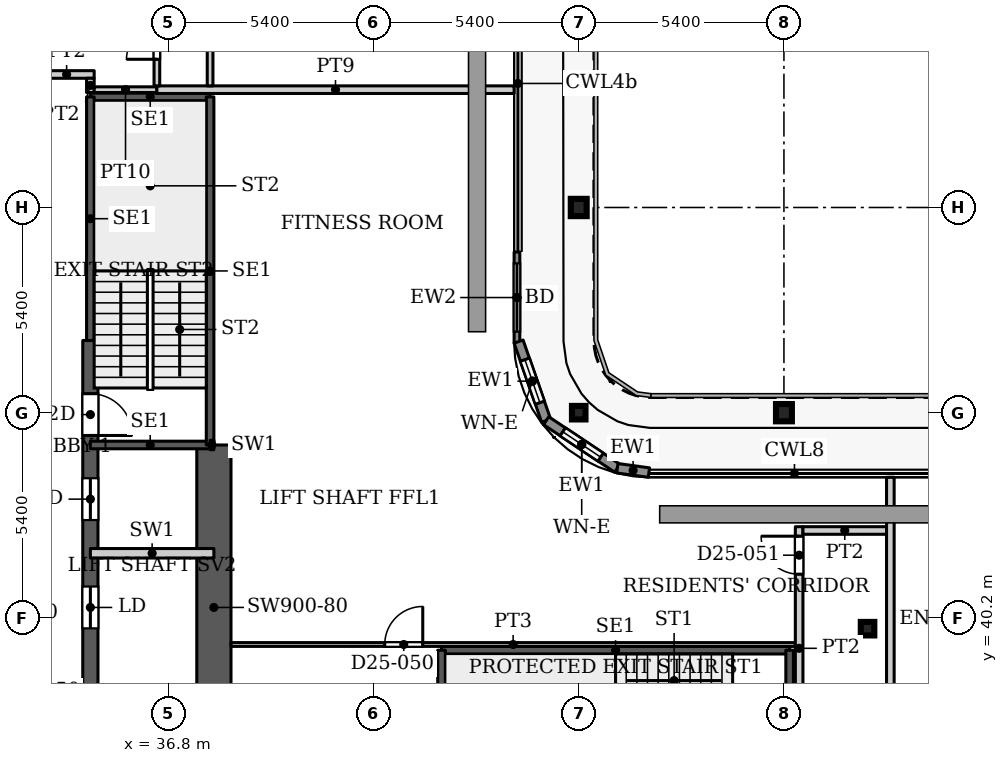
"""IFC4 building model, lengths in metres.
Left out: names, types, materials, properties, quantities, classifications, styles, units other than length and angle.
Written with IfcOpenShell. Run it as: python <this file> out.ifc"""

import sys

from ifc_helpers import new_model, si_unit, direction, frame, frame_2d, origin, origin_2d, place, context, subcontext, project, spatial, rectangle, hollow_rectangle, i_section, extrude, source, transform, mapped, element, fill, save


model = new_model("IFC4")
c1 = context("Model", 3, precision=1e-05, world=origin(), true_north=direction((0.0, 1.0)))
c2 = subcontext(c1, "Body", "Model", "MODEL_VIEW")
j1 = project(units=[si_unit("LENGTHUNIT", "METRE"), si_unit("PLANEANGLEUNIT", "RADIAN")], contexts=[c1])
p1 = place(None, origin())
s1 = spatial("IfcSite", under=j1, at=p1, CompositionType="ELEMENT")
p2 = place(p1, origin())
s2 = spatial("IfcBuilding", under=s1, at=p2, CompositionType="ELEMENT")
p3 = place(p2, frame((0.0, 0.0, 113.6)))
s3 = spatial("IfcBuildingStorey", under=s2, at=p3, CompositionType="ELEMENT", Elevation=113.6)
for number, where, z_axis, x_axis in (
    (1, (53.0, 45.6, 0.0), (0.0, 0.0, 1.0), (1.0, 0.0, 0.0)),
    (2, (47.6, 51.0, 0.0), (0.0, 0.0, 1.0), (1.0, 0.0, 0.0)),
):
    element("IfcColumn", number, at=place(p3, frame(where, z_axis=z_axis, x_axis=x_axis)), inside=s3, PredefinedType="COLUMN", context=c2, shape_type="SweptSolid", body=[
        extrude(i_section(OverallWidth=0.418, OverallDepth=0.455, WebThickness=0.042, FlangeThickness=0.068, FilletRadius=0.014, at=origin_2d()), origin(), (0.0, 0.0, 1.0), 3.9),
    ])
for number, where, z_axis, x_axis in (
    (3, (55.2, 39.916, 0.0), (0.0, 0.0, 1.0), (1.0, 0.0, 0.0)),
    (4, (47.6, 45.6, 0.0), (0.0, 0.0, 1.0), (1.0, 0.0, 0.0)),
):
    element("IfcColumn", number, at=place(p3, frame(where, z_axis=z_axis, x_axis=x_axis)), inside=s3, PredefinedType="COLUMN", context=c2, shape_type="SweptSolid", body=[
        extrude(hollow_rectangle(XDim=0.356, YDim=0.356, WallThickness=0.016, InnerFilletRadius=0.016, OuterFilletRadius=0.032, at=origin_2d()), origin(), (0.0, 0.0, 1.0), 3.9),
    ])
p4 = place(p3, frame((34.75, 29.05, 0.0), z_axis=(0.0, 0.0, 1.0), x_axis=(0.0, 1.0, 0.0)))
e5 = element("IfcWall", 5, at=p4, inside=s3, PredefinedType="SHEAR", context=c2, shape_type="SweptSolid", body=[
    extrude(rectangle(XDim=18.45, YDim=0.4, at=frame_2d((9.225, 0.0))), origin(), (0.0, 0.0, 1.0), 3.9),
])
p5 = place(p4, frame((8.025, 0.0, 0.0)))
e6 = element("IfcOpeningElement", 6, at=p5, cuts=e5, PredefinedType="OPENING", context=c2, shape_type="SweptSolid", body=[
    extrude(rectangle(XDim=1.1, YDim=2.2, at=frame_2d((0.55, 1.1))), frame((0.0, 0.21, 0.0), z_axis=(0.0, -1.0, 0.0), x_axis=(1.0, 0.0, 0.0)), (0.0, 0.0, 1.0), 0.42),
])
p6 = place(p4, frame((10.875, 0.0, 0.0)))
e7 = element("IfcOpeningElement", 7, at=p6, cuts=e5, PredefinedType="OPENING", context=c2, shape_type="SweptSolid", body=[
    extrude(rectangle(XDim=1.1, YDim=2.2, at=frame_2d((0.55, 1.1))), frame((0.0, 0.21, 0.0), z_axis=(0.0, -1.0, 0.0), x_axis=(1.0, 0.0, 0.0)), (0.0, 0.0, 1.0), 0.42),
])
p7 = place(p4, frame((13.725, 0.0, 0.0)))
e8 = element("IfcOpeningElement", 8, at=p7, cuts=e5, PredefinedType="OPENING", context=c2, shape_type="SweptSolid", body=[
    extrude(rectangle(XDim=1.1, YDim=2.2, at=frame_2d((0.55, 1.1))), frame((0.0, 0.21, 0.0), z_axis=(0.0, -1.0, 0.0), x_axis=(1.0, 0.0, 0.0)), (0.0, 0.0, 1.0), 0.42),
])
p8 = place(p4, frame((15.95, 0.0, 0.0)))
e9 = element("IfcOpeningElement", 9, at=p8, cuts=e5, PredefinedType="OPENING", context=c2, shape_type="SweptSolid", body=[
    extrude(rectangle(XDim=1.1, YDim=2.2, at=frame_2d((0.55, 1.1))), frame((0.0, 0.21, 0.0), z_axis=(0.0, -1.0, 0.0), x_axis=(1.0, 0.0, 0.0)), (0.0, 0.0, 1.0), 0.42),
])
p9 = place(p3, frame((38.0, 36.2, 0.0), z_axis=(0.0, 0.0, 1.0), x_axis=(0.0, 1.0, 0.0)))
e10 = element("IfcWall", 10, at=p9, inside=s3, PredefinedType="SHEAR", context=c2, shape_type="SweptSolid", body=[
    extrude(rectangle(XDim=8.55, YDim=0.9, at=frame_2d((4.275, 0.0))), origin(), (0.0, 0.0, 1.0), 3.9),
])
p10 = place(p3, frame((45.975, 49.83, 0.0), z_axis=(0.0, 0.0, 1.0), x_axis=(0.0, -1.0, 0.0)))
e11 = element("IfcWall", 11, at=p10, inside=s3, PredefinedType="SOLIDWALL", context=c2, shape_type="SweptSolid", body=[
    extrude(rectangle(XDim=2.4, YDim=0.15, at=frame_2d((1.2, 0.0))), origin(), (0.0, 0.0, 1.0), 3.75),
])
p11 = place(p10, frame((0.3, 0.0, 0.0)))
e12 = element("IfcOpeningElement", 12, at=p11, cuts=e11, PredefinedType="OPENING", context=c2, shape_type="SweptSolid", body=[
    extrude(rectangle(XDim=1.8, YDim=2.4, at=frame_2d((0.9, 1.2))), frame((0.0, 0.085, 0.0), z_axis=(0.0, -1.0, 0.0), x_axis=(1.0, 0.0, 0.0)), (0.0, 0.0, 1.0), 0.17),
])
p12 = place(p3, frame((46.018, 47.471, 0.0), z_axis=(0.0, 0.0, 1.0), x_axis=(0.328791208903, -0.944402637093, 0.0)))
e13 = element("IfcWall", 13, at=p12, inside=s3, PredefinedType="SOLIDWALL", context=c2, shape_type="SweptSolid", body=[
    extrude(rectangle(XDim=2.205, YDim=0.25, at=frame_2d((1.102, 0.0))), origin(), (0.0, 0.0, 1.0), 3.75),
])
p13 = place(p12, frame((0.503, 0.0, 0.6)))
e14 = element("IfcOpeningElement", 14, at=p13, cuts=e13, PredefinedType="OPENING", context=c2, shape_type="SweptSolid", body=[
    extrude(rectangle(XDim=1.2, YDim=2.1, at=frame_2d((0.6, 1.05))), frame((0.0, 0.135, 0.0), z_axis=(0.0, -1.0, 0.0), x_axis=(1.0, 0.0, 0.0)), (0.0, 0.0, 1.0), 0.27),
])
p14 = place(p3, frame((46.743, 45.389, 0.0), z_axis=(0.0, 0.0, 1.0), x_axis=(0.831449265529, -0.555600682912, 0.0)))
e15 = element("IfcWall", 15, at=p14, inside=s3, PredefinedType="SOLIDWALL", context=c2, shape_type="SweptSolid", body=[
    extrude(rectangle(XDim=2.251, YDim=0.25, at=frame_2d((1.126, 0.0))), origin(), (0.0, 0.0, 1.0), 3.75),
])
p15 = place(p14, frame((0.525, 0.0, 0.6)))
e16 = element("IfcOpeningElement", 16, at=p15, cuts=e15, PredefinedType="OPENING", context=c2, shape_type="SweptSolid", body=[
    extrude(rectangle(XDim=1.2, YDim=2.1, at=frame_2d((0.6, 1.05))), frame((0.0, 0.135, 0.0), z_axis=(0.0, -1.0, 0.0), x_axis=(1.0, 0.0, 0.0)), (0.0, 0.0, 1.0), 0.27),
])
p16 = place(p3, frame((48.615, 44.138, 0.0), z_axis=(0.0, 0.0, 1.0), x_axis=(0.990741504246, -0.135761819977, 0.0)))
e17 = element("IfcWall", 17, at=p16, inside=s3, PredefinedType="SOLIDWALL", context=c2, shape_type="SweptSolid", body=[
    extrude(rectangle(XDim=0.84, YDim=0.25, at=frame_2d((0.42, 0.0))), origin(), (0.0, 0.0, 1.0), 3.75),
])
p17 = place(p3, frame((43.99, 39.35, 0.0), z_axis=(0.0, 0.0, 1.0), x_axis=(1.0, 0.0, 0.0)))
e18 = element("IfcWall", 18, at=p17, inside=s3, PredefinedType="SHEAR", context=c2, shape_type="SweptSolid", body=[
    extrude(rectangle(XDim=9.16, YDim=0.2, at=frame_2d((4.58, 0.0))), origin(), (0.0, 0.0, 1.0), 3.9),
])
for number, where, z_axis, x_axis in (
    (19, (43.99, 36.2, 0.0), (0.0, 0.0, 1.0), (0.0, 1.0, 0.0)),
    (20, (53.15, 36.2, 0.0), (0.0, 0.0, 1.0), (0.0, 1.0, 0.0)),
):
    element("IfcWall", number, at=place(p3, frame(where, z_axis=z_axis, x_axis=x_axis)), inside=s3, PredefinedType="SHEAR", context=c2, shape_type="SweptSolid", body=[
        extrude(rectangle(XDim=3.15, YDim=0.2, at=frame_2d((1.575, 0.0))), origin(), (0.0, 0.0, 1.0), 3.9),
    ])
for number, where, z_axis, x_axis in (
    (21, (34.75, 44.75, 0.0), (0.0, 0.0, 1.0), (1.0, 0.0, 0.0)),
    (22, (34.75, 53.91, 0.0), (0.0, 0.0, 1.0), (1.0, 0.0, 0.0)),
):
    element("IfcWall", number, at=place(p3, frame(where, z_axis=z_axis, x_axis=x_axis)), inside=s3, PredefinedType="SHEAR", context=c2, shape_type="SweptSolid", body=[
        extrude(rectangle(XDim=3.15, YDim=0.2, at=frame_2d((1.575, 0.0))), origin(), (0.0, 0.0, 1.0), 3.9),
    ])
p18 = place(p3, frame((34.75, 47.5, 0.0), z_axis=(0.0, 0.0, 1.0), x_axis=(0.0, 1.0, 0.0)))
e23 = element("IfcWall", 23, at=p18, inside=s3, PredefinedType="SHEAR", context=c2, shape_type="SweptSolid", body=[
    extrude(rectangle(XDim=6.41, YDim=0.2, at=frame_2d((3.205, 0.0))), origin(), (0.0, 0.0, 1.0), 3.9),
])
p19 = place(p3, frame((37.9, 44.75, 0.0), z_axis=(0.0, 0.0, 1.0), x_axis=(0.0, 1.0, 0.0)))
e24 = element("IfcWall", 24, at=p19, inside=s3, PredefinedType="SHEAR", context=c2, shape_type="SweptSolid", body=[
    extrude(rectangle(XDim=9.16, YDim=0.2, at=frame_2d((4.58, 0.0))), origin(), (0.0, 0.0, 1.0), 3.9),
])
p20 = place(p3, frame((34.75, 41.9, 0.0), z_axis=(0.0, 0.0, 1.0), x_axis=(1.0, 0.0, 0.0)))
e25 = element("IfcWall", 25, at=p20, inside=s3, PredefinedType="PARTITIONING", context=c2, shape_type="SweptSolid", body=[
    extrude(rectangle(XDim=3.25, YDim=0.25, at=frame_2d((1.625, 0.0))), origin(), (0.0, 0.0, 1.0), 3.9),
])
p21 = place(p3, frame((37.9, 44.75, 0.0), z_axis=(0.0, 0.0, 1.0), x_axis=(1.0, 0.0, 0.0)))
e26 = element("IfcWall", 26, at=p21, inside=s3, PredefinedType="PARTITIONING", context=c2, shape_type="SweptSolid", body=[
    extrude(rectangle(XDim=0.1, YDim=0.25, at=frame_2d((0.05, 0.0))), origin(), (0.0, 0.0, 1.0), 3.9),
])
p22 = place(p3, frame((33.4, 54.5, 0.0), z_axis=(0.0, 0.0, 1.0), x_axis=(1.0, 0.0, 0.0)))
e27 = element("IfcWall", 27, at=p22, inside=s3, PredefinedType="PARTITIONING", context=c2, shape_type="SweptSolid", body=[
    extrude(rectangle(XDim=1.45, YDim=0.2, at=frame_2d((0.725, 0.0))), origin(), (0.0, 0.0, 1.0), 3.6),
])
p23 = place(p3, frame((34.75, 54.025, 0.0), z_axis=(0.0, 0.0, 1.0), x_axis=(0.0, 1.0, 0.0)))
e28 = element("IfcWall", 28, at=p23, inside=s3, PredefinedType="PARTITIONING", context=c2, shape_type="SweptSolid", body=[
    extrude(rectangle(XDim=0.375, YDim=0.2, at=frame_2d((0.188, 0.0))), origin(), (0.0, 0.0, 1.0), 3.6),
])
p24 = place(p3, frame((34.85, 54.1, 0.0), z_axis=(0.0, 0.0, 1.0), x_axis=(1.0, 0.0, 0.0)))
e29 = element("IfcWall", 29, at=p24, inside=s3, PredefinedType="PARTITIONING", context=c2, shape_type="SweptSolid", body=[
    extrude(rectangle(XDim=1.65, YDim=0.15, at=frame_2d((0.825, 0.0))), origin(), (0.0, 0.0, 1.0), 3.6),
])
p25 = place(p3, frame((36.5, 54.1, 0.0), z_axis=(0.0, 0.0, 1.0), x_axis=(1.0, 0.0, 0.0)))
e30 = element("IfcWall", 30, at=p25, inside=s3, PredefinedType="PARTITIONING", context=c2, shape_type="SweptSolid", body=[
    extrude(rectangle(XDim=9.4, YDim=0.2, at=frame_2d((4.7, 0.0))), origin(), (0.0, 0.0, 1.0), 3.6),
])
p26 = place(p3, frame((36.5, 54.2, 0.0), z_axis=(0.0, 0.0, 1.0), x_axis=(0.0, 1.0, 0.0)))
e31 = element("IfcWall", 31, at=p26, inside=s3, PredefinedType="PARTITIONING", context=c2, shape_type="SweptSolid", body=[
    extrude(rectangle(XDim=2.225, YDim=0.15, at=frame_2d((1.113, 0.0))), origin(), (0.0, 0.0, 1.0), 3.6),
])
p27 = place(p26, frame((0.7, 0.0, 0.0)))
e32 = element("IfcOpeningElement", 32, at=p27, cuts=e31, PredefinedType="OPENING", context=c2, shape_type="SweptSolid", body=[
    extrude(rectangle(XDim=0.8, YDim=2.1, at=frame_2d((0.4, 1.05))), frame((0.0, 0.085, 0.0), z_axis=(0.0, -1.0, 0.0), x_axis=(1.0, 0.0, 0.0)), (0.0, 0.0, 1.0), 0.17),
])
p28 = place(p3, frame((37.9, 54.2, 0.0), z_axis=(0.0, 0.0, 1.0), x_axis=(0.0, 1.0, 0.0)))
e33 = element("IfcWall", 33, at=p28, inside=s3, PredefinedType="PARTITIONING", context=c2, shape_type="SweptSolid", body=[
    extrude(rectangle(XDim=9.1, YDim=0.15, at=frame_2d((4.55, 0.0))), origin(), (0.0, 0.0, 1.0), 3.6),
])
p29 = place(p28, frame((6.8, 0.0, 0.0)))
e34 = element("IfcOpeningElement", 34, at=p29, cuts=e33, PredefinedType="OPENING", context=c2, shape_type="SweptSolid", body=[
    extrude(rectangle(XDim=0.9, YDim=2.1, at=frame_2d((0.45, 1.05))), frame((0.0, 0.085, 0.0), z_axis=(0.0, -1.0, 0.0), x_axis=(1.0, 0.0, 0.0)), (0.0, 0.0, 1.0), 0.17),
])
p30 = place(p28, frame((2.1, 0.0, 0.0)))
e35 = element("IfcOpeningElement", 35, at=p30, cuts=e33, PredefinedType="OPENING", context=c2, shape_type="SweptSolid", body=[
    extrude(rectangle(XDim=1.0, YDim=2.1, at=frame_2d((0.5, 1.05))), frame((0.0, 0.085, 0.0), z_axis=(0.0, -1.0, 0.0), x_axis=(1.0, 0.0, 0.0)), (0.0, 0.0, 1.0), 0.17),
])
p31 = place(p3, frame((38.449, 39.5, 0.0), z_axis=(0.0, 0.0, 1.0), x_axis=(1.0, 0.0, 0.0)))
e36 = element("IfcWall", 36, at=p31, inside=s3, PredefinedType="PARTITIONING", context=c2, shape_type="SweptSolid", body=[
    extrude(rectangle(XDim=14.851, YDim=0.1, at=frame_2d((7.426, 0.0))), origin(), (0.0, 0.0, 1.0), 3.6),
])
p32 = place(p31, frame((4.047, 0.0, 0.0)))
e37 = element("IfcOpeningElement", 37, at=p32, cuts=e36, PredefinedType="OPENING", context=c2, shape_type="SweptSolid", body=[
    extrude(rectangle(XDim=1.0, YDim=2.1, at=frame_2d((0.5, 1.05))), frame((0.0, 0.06, 0.0), z_axis=(0.0, -1.0, 0.0), x_axis=(1.0, 0.0, 0.0)), (0.0, 0.0, 1.0), 0.12),
])
p33 = place(p3, frame((53.4, 36.199, 0.0), z_axis=(0.0, 0.0, 1.0), x_axis=(0.0, 1.0, 0.0)))
e38 = element("IfcWall", 38, at=p33, inside=s3, PredefinedType="PARTITIONING", context=c2, shape_type="SweptSolid", body=[
    extrude(rectangle(XDim=6.401, YDim=0.2, at=frame_2d((3.201, 0.0))), origin(), (0.0, 0.0, 1.0), 3.6),
])
p34 = place(p33, frame((5.151, 0.0, 0.0)))
e39 = element("IfcOpeningElement", 39, at=p34, cuts=e38, PredefinedType="OPENING", context=c2, shape_type="SweptSolid", body=[
    extrude(rectangle(XDim=1.0, YDim=2.1, at=frame_2d((0.5, 1.05))), frame((0.0, 0.11, 0.0), z_axis=(0.0, -1.0, 0.0), x_axis=(1.0, 0.0, 0.0)), (0.0, 0.0, 1.0), 0.22),
])
p35 = place(p3, frame((53.5, 42.5, 0.0), z_axis=(0.0, 0.0, 1.0), x_axis=(1.0, 0.0, 0.0)))
e40 = element("IfcWall", 40, at=p35, inside=s3, PredefinedType="PARTITIONING", context=c2, shape_type="SweptSolid", body=[
    extrude(rectangle(XDim=2.2, YDim=0.2, at=frame_2d((1.1, 0.0))), origin(), (0.0, 0.0, 1.0), 3.6),
])
p36 = place(p3, frame((55.8, 30.4, 0.0), z_axis=(0.0, 0.0, 1.0), x_axis=(0.0, 1.0, 0.0)))
e41 = element("IfcWall", 41, at=p36, inside=s3, PredefinedType="PARTITIONING", context=c2, shape_type="SweptSolid", body=[
    extrude(rectangle(XDim=13.5, YDim=0.2, at=frame_2d((6.75, 0.0))), origin(), (0.0, 0.0, 1.0), 3.6),
])
m1 = source(origin(), c2, "Body", "SweptSolid", [
    extrude(rectangle(XDim=1.8, YDim=2.4, at=frame_2d((0.9, 1.2))), frame((0.0, 0.025, 0.0), z_axis=(0.0, -1.0, 0.0), x_axis=(1.0, 0.0, 0.0)), (0.0, 0.0, 1.0), 0.05),
])
p37 = place(p11, origin())
e42 = element("IfcDoor", 42, at=p37, inside=s3, OperationType="SLIDING_TO_LEFT", PredefinedType="DOOR", context=c2, shape_type="MappedRepresentation", body=[
    mapped(m1, transform((0.0, 0.0, 0.0), x_axis=(1.0, 0.0, 0.0), y_axis=(0.0, 1.0, 0.0), z_axis=(0.0, 0.0, 1.0), scale=1.0)),
])
fill(e12, e42)
m2 = source(origin(), c2, "Body", "SweptSolid", [
    extrude(rectangle(XDim=1.2, YDim=2.1, at=frame_2d((0.6, 1.05))), frame((0.0, 0.03, 0.0), z_axis=(0.0, -1.0, 0.0), x_axis=(1.0, 0.0, 0.0)), (0.0, 0.0, 1.0), 0.06),
])
p38 = place(p13, origin())
e43 = element("IfcWindow", 43, at=p38, inside=s3, PartitioningType="SINGLE_PANEL", PredefinedType="WINDOW", context=c2, shape_type="MappedRepresentation", body=[
    mapped(m2, transform((0.0, 0.0, 0.0), x_axis=(1.0, 0.0, 0.0), y_axis=(0.0, 1.0, 0.0), z_axis=(0.0, 0.0, 1.0), scale=1.0)),
])
fill(e14, e43)
p39 = place(p15, origin())
e44 = element("IfcWindow", 44, at=p39, inside=s3, PartitioningType="SINGLE_PANEL", PredefinedType="WINDOW", context=c2, shape_type="MappedRepresentation", body=[
    mapped(m2, transform((0.0, 0.0, 0.0), x_axis=(1.0, 0.0, 0.0), y_axis=(0.0, 1.0, 0.0), z_axis=(0.0, 0.0, 1.0), scale=1.0)),
])
fill(e16, e44)
m3 = source(origin(), c2, "Body", "SweptSolid", [
    extrude(rectangle(XDim=1.1, YDim=2.2, at=frame_2d((0.55, 1.1))), frame((0.0, 0.025, 0.0), z_axis=(0.0, -1.0, 0.0), x_axis=(1.0, 0.0, 0.0)), (0.0, 0.0, 1.0), 0.05),
])
p40 = place(p6, origin())
e45 = element("IfcDoor", 45, at=p40, inside=s3, OperationType="SLIDING_TO_LEFT", PredefinedType="DOOR", context=c2, shape_type="MappedRepresentation", body=[
    mapped(m3, transform((0.0, 0.0, 0.0), x_axis=(1.0, 0.0, 0.0), y_axis=(0.0, 1.0, 0.0), z_axis=(0.0, 0.0, 1.0), scale=1.0)),
])
fill(e7, e45)
p41 = place(p7, origin())
e46 = element("IfcDoor", 46, at=p41, inside=s3, OperationType="SLIDING_TO_LEFT", PredefinedType="DOOR", context=c2, shape_type="MappedRepresentation", body=[
    mapped(m3, transform((0.0, 0.0, 0.0), x_axis=(1.0, 0.0, 0.0), y_axis=(0.0, 1.0, 0.0), z_axis=(0.0, 0.0, 1.0), scale=1.0)),
])
fill(e8, e46)
m4 = source(origin(), c2, "Body", "SweptSolid", [
    extrude(rectangle(XDim=1.1, YDim=2.2, at=frame_2d((0.55, 1.1))), frame((0.0, 0.025, 0.0), z_axis=(0.0, -1.0, 0.0), x_axis=(1.0, 0.0, 0.0)), (0.0, 0.0, 1.0), 0.05),
])
p42 = place(p8, origin())
e47 = element("IfcDoor", 47, at=p42, inside=s3, OperationType="SINGLE_SWING_RIGHT", PredefinedType="DOOR", context=c2, shape_type="MappedRepresentation", body=[
    mapped(m4, transform((0.0, 0.0, 0.0), x_axis=(1.0, 0.0, 0.0), y_axis=(0.0, 1.0, 0.0), z_axis=(0.0, 0.0, 1.0), scale=1.0)),
])
fill(e9, e47)
m5 = source(origin(), c2, "Body", "SweptSolid", [
    extrude(rectangle(XDim=0.8, YDim=2.1, at=frame_2d((0.4, 1.05))), frame((0.0, 0.025, 0.0), z_axis=(0.0, -1.0, 0.0), x_axis=(1.0, 0.0, 0.0)), (0.0, 0.0, 1.0), 0.05),
])
p43 = place(p27, origin())
e48 = element("IfcDoor", 48, at=p43, inside=s3, OperationType="SINGLE_SWING_LEFT", PredefinedType="DOOR", context=c2, shape_type="MappedRepresentation", body=[
    mapped(m5, transform((0.0, 0.0, 0.0), x_axis=(1.0, 0.0, 0.0), y_axis=(0.0, 1.0, 0.0), z_axis=(0.0, 0.0, 1.0), scale=1.0)),
])
fill(e32, e48)
m6 = source(origin(), c2, "Body", "SweptSolid", [
    extrude(rectangle(XDim=1.0, YDim=2.1, at=frame_2d((0.5, 1.05))), frame((0.0, 0.025, 0.0), z_axis=(0.0, -1.0, 0.0), x_axis=(1.0, 0.0, 0.0)), (0.0, 0.0, 1.0), 0.05),
])
p44 = place(p32, origin())
e49 = element("IfcDoor", 49, at=p44, inside=s3, OperationType="SINGLE_SWING_LEFT", PredefinedType="DOOR", context=c2, shape_type="MappedRepresentation", body=[
    mapped(m6, transform((0.0, 0.0, 0.0), x_axis=(1.0, 0.0, 0.0), y_axis=(0.0, 1.0, 0.0), z_axis=(0.0, 0.0, 1.0), scale=1.0)),
])
fill(e37, e49)
m7 = source(origin(), c2, "Body", "SweptSolid", [
    extrude(rectangle(XDim=1.0, YDim=2.1, at=frame_2d((0.5, 1.05))), frame((0.0, 0.025, 0.0), z_axis=(0.0, -1.0, 0.0), x_axis=(1.0, 0.0, 0.0)), (0.0, 0.0, 1.0), 0.05),
])
p45 = place(p34, origin())
e50 = element("IfcDoor", 50, at=p45, inside=s3, OperationType="SINGLE_SWING_LEFT", PredefinedType="DOOR", context=c2, shape_type="MappedRepresentation", body=[
    mapped(m7, transform((0.0, 0.0, 0.0), x_axis=(1.0, 0.0, 0.0), y_axis=(0.0, 1.0, 0.0), z_axis=(0.0, 0.0, 1.0), scale=1.0)),
])
fill(e39, e50)
save(model, sys.argv[1])
